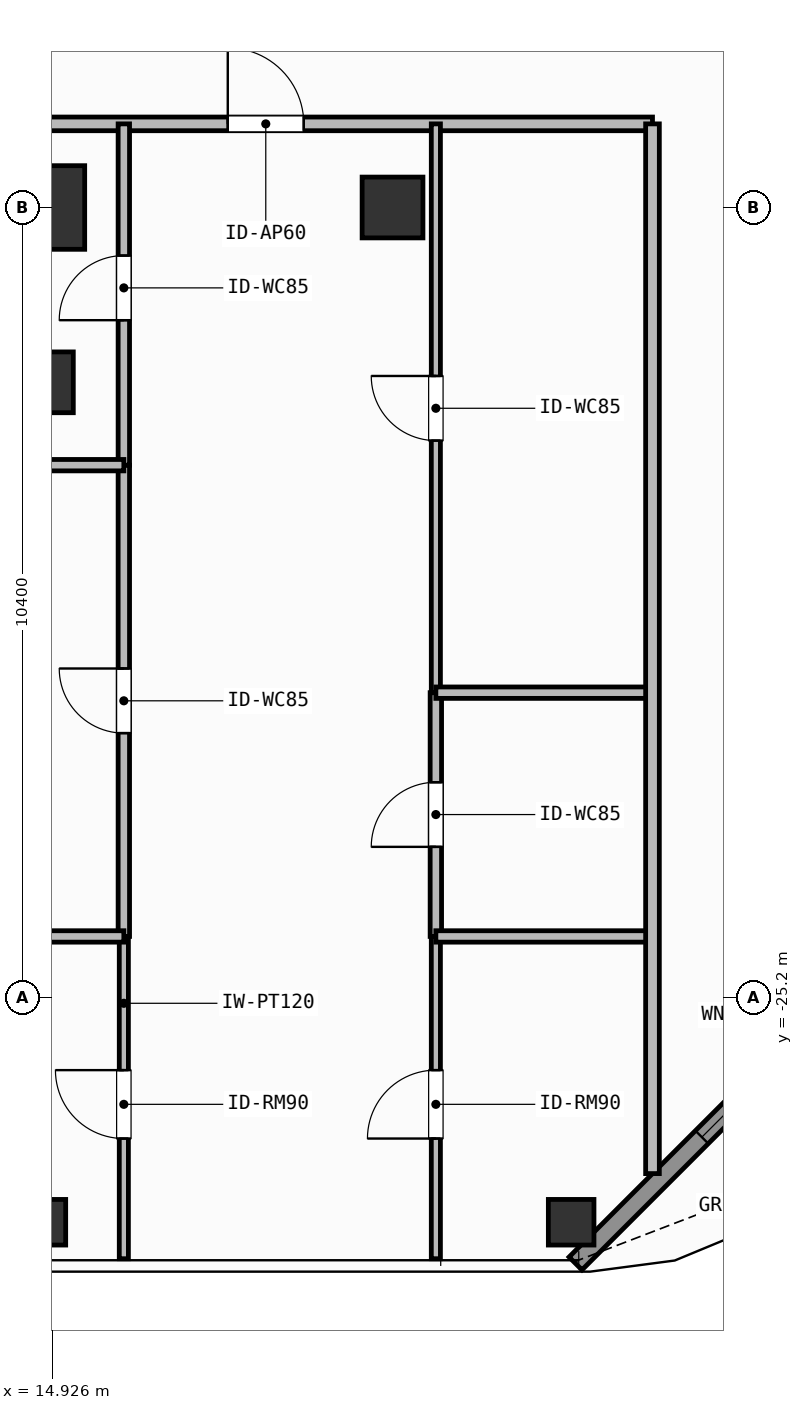
"""IFC4 building model, lengths in metres.
Left out: names, types, materials, properties, quantities, classifications, styles, units other than length and angle.
Written with IfcOpenShell. Run it as: python <this file> out.ifc"""

import sys

from ifc_helpers import new_model, si_unit, direction, frame, frame_2d, origin, origin_2d, place, context, subcontext, project, spatial, rectangle, hollow_rectangle, extrude, element, fill, save


model = new_model("IFC4")
c1 = context("Model", 3, precision=1e-05, world=origin(), true_north=direction((0.0, 1.0)))
c2 = subcontext(c1, "Body", "Model", "MODEL_VIEW")
j1 = project(units=[si_unit("LENGTHUNIT", "METRE"), si_unit("PLANEANGLEUNIT", "RADIAN")], contexts=[c1])
p1 = place(None, origin())
s1 = spatial("IfcSite", under=j1, at=p1, CompositionType="ELEMENT")
p2 = place(p1, origin())
s2 = spatial("IfcBuilding", under=s1, at=p2, CompositionType="ELEMENT")
p3 = place(p2, frame((0.0, 0.0, 231.3)))
s3 = spatial("IfcBuildingStorey", under=s2, at=p3, CompositionType="ELEMENT", Elevation=231.3)
p4 = place(p3, frame((14.8, -14.8, 0.0), z_axis=(0.0, 0.0, 1.0), x_axis=(1.0, 0.0, 0.0)))
e1 = element("IfcColumn", 1, at=p4, inside=s3, PredefinedType="COLUMN", context=c2, shape_type="SweptSolid", body=[
    extrude(rectangle(XDim=1.1, YDim=1.1, at=origin_2d()), origin(), (0.0, 0.0, 1.0), 3.9),
])
for number, where, z_axis, x_axis in (
    (2, (19.4, -14.8, 0.0), (0.0, 0.0, 1.0), (1.0, 0.0, 0.0)),
    (3, (14.8, -17.1, 0.0), (0.0, 0.0, 1.0), (1.0, 0.0, 0.0)),
):
    element("IfcColumn", number, at=place(p3, frame(where, z_axis=z_axis, x_axis=x_axis)), inside=s3, PredefinedType="COLUMN", context=c2, shape_type="SweptSolid", body=[
        extrude(hollow_rectangle(XDim=0.8, YDim=0.8, WallThickness=0.036, at=origin_2d()), origin(), (0.0, 0.0, 1.0), 3.9),
    ])
for number, where, z_axis, x_axis in (
    (4, (21.75, -28.15, 0.0), (0.0, 0.0, 1.0), (1.0, 0.0, 0.0)),
    (5, (14.8, -28.15, 0.0), (0.0, 0.0, 1.0), (1.0, 0.0, 0.0)),
):
    element("IfcColumn", number, at=place(p3, frame(where, z_axis=z_axis, x_axis=x_axis)), inside=s3, PredefinedType="COLUMN", context=c2, shape_type="SweptSolid", body=[
        extrude(hollow_rectangle(XDim=0.6, YDim=0.6, WallThickness=0.028, at=origin_2d()), origin(), (0.0, 0.0, 1.0), 3.9),
    ])
p5 = place(p3, frame((26.192, -24.308, 0.0), z_axis=(0.0, 0.0, 1.0), x_axis=(-0.707106781187, -0.707106781187, 0.0)))
e6 = element("IfcWall", 6, at=p5, inside=s3, PredefinedType="SOLIDWALL", context=c2, shape_type="SweptSolid", body=[
    extrude(rectangle(XDim=6.201, YDim=0.24, at=frame_2d((3.101, 0.0))), origin(), (0.0, 0.0, 1.0), 3.6),
])
p6 = place(p5, frame((2.351, 0.0, 0.8)))
e7 = element("IfcOpeningElement", 7, at=p6, cuts=e6, PredefinedType="OPENING", context=c2, shape_type="SweptSolid", body=[
    extrude(rectangle(XDim=1.5, YDim=1.85, at=frame_2d((0.75, 0.925))), frame((0.0, 0.13, 0.0), z_axis=(0.0, -1.0, 0.0), x_axis=(1.0, 0.0, 0.0)), (0.0, 0.0, 1.0), 0.26),
])
p7 = place(p3, frame((11.228, -13.7, 0.0), z_axis=(0.0, 0.0, 1.0), x_axis=(1.0, 0.0, 0.0)))
e8 = element("IfcWall", 8, at=p7, inside=s3, PredefinedType="PARTITIONING", context=c2, shape_type="SweptSolid", body=[
    extrude(rectangle(XDim=11.592, YDim=0.18, at=frame_2d((5.796, 0.0))), origin(), (0.0, 0.0, 1.0), 3.6),
])
p8 = place(p7, frame((6.004, 0.0, 0.0)))
e9 = element("IfcOpeningElement", 9, at=p8, cuts=e8, PredefinedType="OPENING", context=c2, shape_type="SweptSolid", body=[
    extrude(rectangle(XDim=1.0, YDim=2.2, at=frame_2d((0.5, 1.1))), frame((0.0, 0.1, 0.0), z_axis=(0.0, -1.0, 0.0), x_axis=(1.0, 0.0, 0.0)), (0.0, 0.0, 1.0), 0.2),
])
p9 = place(p3, frame((15.865, -24.39, 0.0), z_axis=(0.0, 0.0, 1.0), x_axis=(0.0, 1.0, 0.0)))
e10 = element("IfcWall", 10, at=p9, inside=s3, PredefinedType="PARTITIONING", context=c2, shape_type="SweptSolid", body=[
    extrude(rectangle(XDim=6.2, YDim=0.15, at=frame_2d((3.1, 0.0))), origin(), (0.0, 0.0, 1.0), 3.6),
])
p10 = place(p9, frame((2.675, 0.0, 0.0)))
e11 = element("IfcOpeningElement", 11, at=p10, cuts=e10, PredefinedType="OPENING", context=c2, shape_type="SweptSolid", body=[
    extrude(rectangle(XDim=0.85, YDim=2.1, at=frame_2d((0.425, 1.05))), frame((0.0, 0.085, 0.0), z_axis=(0.0, -1.0, 0.0), x_axis=(1.0, 0.0, 0.0)), (0.0, 0.0, 1.0), 0.17),
])
p11 = place(p3, frame((15.865, -18.19, 0.0), z_axis=(0.0, 0.0, 1.0), x_axis=(0.0, 1.0, 0.0)))
e12 = element("IfcWall", 12, at=p11, inside=s3, PredefinedType="PARTITIONING", context=c2, shape_type="SweptSolid", body=[
    extrude(rectangle(XDim=4.49, YDim=0.15, at=frame_2d((2.245, 0.0))), origin(), (0.0, 0.0, 1.0), 3.6),
])
p12 = place(p11, frame((1.907, 0.0, 0.0)))
e13 = element("IfcOpeningElement", 13, at=p12, cuts=e12, PredefinedType="OPENING", context=c2, shape_type="SweptSolid", body=[
    extrude(rectangle(XDim=0.85, YDim=2.1, at=frame_2d((0.425, 1.05))), frame((0.0, 0.085, 0.0), z_axis=(0.0, -1.0, 0.0), x_axis=(1.0, 0.0, 0.0)), (0.0, 0.0, 1.0), 0.17),
])
p13 = place(p3, frame((15.865, -28.63, 0.0), z_axis=(0.0, 0.0, 1.0), x_axis=(0.0, 1.0, 0.0)))
e14 = element("IfcWall", 14, at=p13, inside=s3, PredefinedType="PARTITIONING", context=c2, shape_type="SweptSolid", body=[
    extrude(rectangle(XDim=4.24, YDim=0.12, at=frame_2d((2.12, 0.0))), origin(), (0.0, 0.0, 1.0), 3.6),
])
p14 = place(p13, frame((1.581, 0.0, 0.0)))
e15 = element("IfcOpeningElement", 15, at=p14, cuts=e14, PredefinedType="OPENING", context=c2, shape_type="SweptSolid", body=[
    extrude(rectangle(XDim=0.9, YDim=2.1, at=frame_2d((0.45, 1.05))), frame((0.0, 0.07, 0.0), z_axis=(0.0, -1.0, 0.0), x_axis=(1.0, 0.0, 0.0)), (0.0, 0.0, 1.0), 0.14),
])
p15 = place(p3, frame((19.97, -24.39, 0.0), z_axis=(0.0, 0.0, 1.0), x_axis=(0.0, 1.0, 0.0)))
e16 = element("IfcWall", 16, at=p15, inside=s3, PredefinedType="PARTITIONING", context=c2, shape_type="SweptSolid", body=[
    extrude(rectangle(XDim=3.207, YDim=0.15, at=frame_2d((1.604, 0.0))), origin(), (0.0, 0.0, 1.0), 3.6),
])
p16 = place(p15, frame((1.178, 0.0, 0.0)))
e17 = element("IfcOpeningElement", 17, at=p16, cuts=e16, PredefinedType="OPENING", context=c2, shape_type="SweptSolid", body=[
    extrude(rectangle(XDim=0.85, YDim=2.1, at=frame_2d((0.425, 1.05))), frame((0.0, 0.085, 0.0), z_axis=(0.0, -1.0, 0.0), x_axis=(1.0, 0.0, 0.0)), (0.0, 0.0, 1.0), 0.17),
])
p17 = place(p3, frame((19.97, -21.183, 0.0), z_axis=(0.0, 0.0, 1.0), x_axis=(0.0, 1.0, 0.0)))
e18 = element("IfcWall", 18, at=p17, inside=s3, PredefinedType="PARTITIONING", context=c2, shape_type="SweptSolid", body=[
    extrude(rectangle(XDim=7.483, YDim=0.12, at=frame_2d((3.742, 0.0))), origin(), (0.0, 0.0, 1.0), 3.6),
])
p18 = place(p17, frame((3.316, 0.0, 0.0)))
e19 = element("IfcOpeningElement", 19, at=p18, cuts=e18, PredefinedType="OPENING", context=c2, shape_type="SweptSolid", body=[
    extrude(rectangle(XDim=0.85, YDim=2.1, at=frame_2d((0.425, 1.05))), frame((0.0, 0.07, 0.0), z_axis=(0.0, -1.0, 0.0), x_axis=(1.0, 0.0, 0.0)), (0.0, 0.0, 1.0), 0.14),
])
p19 = place(p3, frame((19.97, -28.63, 0.0), z_axis=(0.0, 0.0, 1.0), x_axis=(0.0, 1.0, 0.0)))
e20 = element("IfcWall", 20, at=p19, inside=s3, PredefinedType="PARTITIONING", context=c2, shape_type="SweptSolid", body=[
    extrude(rectangle(XDim=4.24, YDim=0.12, at=frame_2d((2.12, 0.0))), origin(), (0.0, 0.0, 1.0), 3.6),
])
p20 = place(p19, frame((1.581, 0.0, 0.0)))
e21 = element("IfcOpeningElement", 21, at=p20, cuts=e20, PredefinedType="OPENING", context=c2, shape_type="SweptSolid", body=[
    extrude(rectangle(XDim=0.9, YDim=2.1, at=frame_2d((0.45, 1.05))), frame((0.0, 0.07, 0.0), z_axis=(0.0, -1.0, 0.0), x_axis=(1.0, 0.0, 0.0)), (0.0, 0.0, 1.0), 0.14),
])
for number, where, z_axis, x_axis in (
    (22, (11.228, -18.19, 0.0), (0.0, 0.0, 1.0), (1.0, 0.0, 0.0)),
    (23, (11.228, -24.39, 0.0), (0.0, 0.0, 1.0), (1.0, 0.0, 0.0)),
):
    element("IfcWall", number, at=place(p3, frame(where, z_axis=z_axis, x_axis=x_axis)), inside=s3, PredefinedType="PARTITIONING", context=c2, shape_type="SweptSolid", body=[
        extrude(rectangle(XDim=4.637, YDim=0.15, at=frame_2d((2.318, 0.0))), origin(), (0.0, 0.0, 1.0), 3.6),
    ])
for number, where, z_axis, x_axis in (
    (24, (19.97, -21.183, 0.0), (0.0, 0.0, 1.0), (1.0, 0.0, 0.0)),
    (25, (19.97, -24.39, 0.0), (0.0, 0.0, 1.0), (1.0, 0.0, 0.0)),
):
    element("IfcWall", number, at=place(p3, frame(where, z_axis=z_axis, x_axis=x_axis)), inside=s3, PredefinedType="PARTITIONING", context=c2, shape_type="SweptSolid", body=[
        extrude(rectangle(XDim=2.85, YDim=0.15, at=frame_2d((1.425, 0.0))), origin(), (0.0, 0.0, 1.0), 3.6),
    ])
p21 = place(p3, frame((22.82, -27.51, 0.0), z_axis=(0.0, 0.0, 1.0), x_axis=(0.0, 1.0, 0.0)))
e26 = element("IfcWall", 26, at=p21, inside=s3, PredefinedType="PARTITIONING", context=c2, shape_type="SweptSolid", body=[
    extrude(rectangle(XDim=13.81, YDim=0.18, at=frame_2d((6.905, 0.0))), origin(), (0.0, 0.0, 1.0), 3.6),
])
p22 = place(p6, origin())
e27 = element("IfcWindow", 27, at=p22, inside=s3, PartitioningType="SINGLE_PANEL", PredefinedType="WINDOW", context=c2, shape_type="SweptSolid", body=[
    extrude(rectangle(XDim=1.5, YDim=1.85, at=frame_2d((0.75, 0.925))), frame((0.0, 0.03, 0.0), z_axis=(0.0, -1.0, 0.0), x_axis=(1.0, 0.0, 0.0)), (0.0, 0.0, 1.0), 0.06),
])
fill(e7, e27)
p23 = place(p8, origin())
e28 = element("IfcDoor", 28, at=p23, inside=s3, OperationType="SINGLE_SWING_LEFT", PredefinedType="DOOR", context=c2, shape_type="SweptSolid", body=[
    extrude(rectangle(XDim=1.0, YDim=2.2, at=frame_2d((0.5, 1.1))), frame((0.0, 0.025, 0.0), z_axis=(0.0, -1.0, 0.0), x_axis=(1.0, 0.0, 0.0)), (0.0, 0.0, 1.0), 0.05),
])
fill(e9, e28)
p24 = place(p10, origin())
e29 = element("IfcDoor", 29, at=p24, inside=s3, OperationType="SINGLE_SWING_RIGHT", PredefinedType="DOOR", context=c2, shape_type="SweptSolid", body=[
    extrude(rectangle(XDim=0.85, YDim=2.1, at=frame_2d((0.425, 1.05))), frame((0.0, 0.025, 0.0), z_axis=(0.0, -1.0, 0.0), x_axis=(1.0, 0.0, 0.0)), (0.0, 0.0, 1.0), 0.05),
])
fill(e11, e29)
p25 = place(p12, origin())
e30 = element("IfcDoor", 30, at=p25, inside=s3, OperationType="SINGLE_SWING_LEFT", PredefinedType="DOOR", context=c2, shape_type="SweptSolid", body=[
    extrude(rectangle(XDim=0.85, YDim=2.1, at=frame_2d((0.425, 1.05))), frame((0.0, 0.025, 0.0), z_axis=(0.0, -1.0, 0.0), x_axis=(1.0, 0.0, 0.0)), (0.0, 0.0, 1.0), 0.05),
])
fill(e13, e30)
p26 = place(p14, origin())
e31 = element("IfcDoor", 31, at=p26, inside=s3, OperationType="SINGLE_SWING_RIGHT", PredefinedType="DOOR", context=c2, shape_type="SweptSolid", body=[
    extrude(rectangle(XDim=0.9, YDim=2.1, at=frame_2d((0.45, 1.05))), frame((0.0, 0.025, 0.0), z_axis=(0.0, -1.0, 0.0), x_axis=(1.0, 0.0, 0.0)), (0.0, 0.0, 1.0), 0.05),
])
fill(e15, e31)
p27 = place(p16, origin())
e32 = element("IfcDoor", 32, at=p27, inside=s3, OperationType="SINGLE_SWING_LEFT", PredefinedType="DOOR", context=c2, shape_type="SweptSolid", body=[
    extrude(rectangle(XDim=0.85, YDim=2.1, at=frame_2d((0.425, 1.05))), frame((0.0, 0.025, 0.0), z_axis=(0.0, -1.0, 0.0), x_axis=(1.0, 0.0, 0.0)), (0.0, 0.0, 1.0), 0.05),
])
fill(e17, e32)
p28 = place(p18, origin())
e33 = element("IfcDoor", 33, at=p28, inside=s3, OperationType="SINGLE_SWING_RIGHT", PredefinedType="DOOR", context=c2, shape_type="SweptSolid", body=[
    extrude(rectangle(XDim=0.85, YDim=2.1, at=frame_2d((0.425, 1.05))), frame((0.0, 0.025, 0.0), z_axis=(0.0, -1.0, 0.0), x_axis=(1.0, 0.0, 0.0)), (0.0, 0.0, 1.0), 0.05),
])
fill(e19, e33)
p29 = place(p20, origin())
e34 = element("IfcDoor", 34, at=p29, inside=s3, OperationType="SINGLE_SWING_LEFT", PredefinedType="DOOR", context=c2, shape_type="SweptSolid", body=[
    extrude(rectangle(XDim=0.9, YDim=2.1, at=frame_2d((0.45, 1.05))), frame((0.0, 0.025, 0.0), z_axis=(0.0, -1.0, 0.0), x_axis=(1.0, 0.0, 0.0)), (0.0, 0.0, 1.0), 0.05),
])
fill(e21, e34)
save(model, sys.argv[1])
